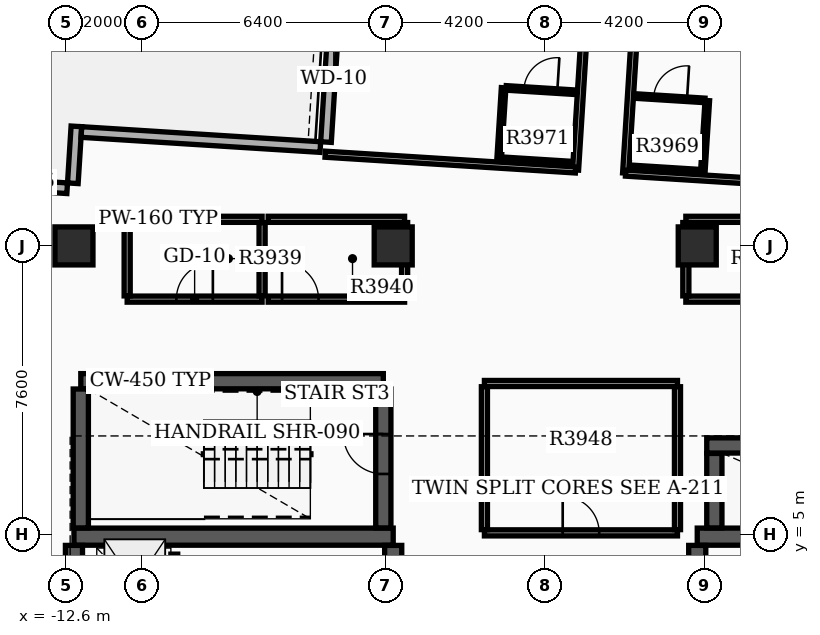
"""IFC4 building model, lengths in metres.
Left out: names, types, materials, properties, quantities, classifications, styles, units other than length and angle.
Written with IfcOpenShell. Run it as: python <this file> out.ifc"""

import sys

from ifc_helpers import new_model, si_unit, direction, frame, frame_2d, origin, origin_2d, place, context, subcontext, project, spatial, rectangle, extrude, element, fill, save


model = new_model("IFC4")
c1 = context("Model", 3, precision=1e-05, world=origin(), true_north=direction((0.0, 1.0)))
c2 = subcontext(c1, "Body", "Model", "MODEL_VIEW")
j1 = project(units=[si_unit("LENGTHUNIT", "METRE"), si_unit("PLANEANGLEUNIT", "RADIAN")], contexts=[c1])
p1 = place(None, origin())
s1 = spatial("IfcSite", under=j1, at=p1, CompositionType="ELEMENT")
p2 = place(p1, origin())
s2 = spatial("IfcBuilding", under=s1, at=p2, CompositionType="ELEMENT")
p3 = place(p2, frame((0.0, 0.0, 249.9)))
s3 = spatial("IfcBuildingStorey", under=s2, at=p3, CompositionType="ELEMENT", Elevation=249.9)
p4 = place(p3, frame((-12.4, 4.95, 0.0), z_axis=(0.0, 0.0, 1.0), x_axis=(1.0, 0.0, 0.0)))
e1 = element("IfcWall", 1, at=p4, inside=s3, PredefinedType="SHEAR", context=c2, shape_type="SweptSolid", body=[
    extrude(rectangle(XDim=8.4, YDim=0.45, at=frame_2d((4.2, 0.0))), origin(), (0.0, 0.0, 1.0), 3.7),
])
p5 = place(p3, frame((-12.4, -6.62, 0.0), z_axis=(0.0, 0.0, 1.0), x_axis=(0.0, 1.0, 0.0)))
e2 = element("IfcWall", 2, at=p5, inside=s3, PredefinedType="SHEAR", context=c2, shape_type="SweptSolid", body=[
    extrude(rectangle(XDim=11.34, YDim=0.45, at=frame_2d((5.67, 0.0))), origin(), (0.0, 0.0, 1.0), 3.7),
])
p6 = place(p3, frame((-4.0, -6.62, 0.0), z_axis=(0.0, 0.0, 1.0), x_axis=(0.0, 1.0, 0.0)))
e3 = element("IfcWall", 3, at=p6, inside=s3, PredefinedType="SHEAR", context=c2, shape_type="SweptSolid", body=[
    extrude(rectangle(XDim=11.34, YDim=0.45, at=frame_2d((5.67, 0.0))), origin(), (0.0, 0.0, 1.0), 3.7),
])
p7 = place(p6, frame((1.37, 0.0, 0.0)))
e4 = element("IfcOpeningElement", 4, at=p7, cuts=e3, PredefinedType="OPENING", context=c2, shape_type="SweptSolid", body=[
    extrude(rectangle(XDim=1.05, YDim=2.15, at=frame_2d((0.525, 1.075))), frame((0.0, 0.235, 0.0), z_axis=(0.0, -1.0, 0.0), x_axis=(1.0, 0.0, 0.0)), (0.0, 0.0, 1.0), 0.47),
])
p8 = place(p6, frame((6.97, 0.0, 0.0)))
e5 = element("IfcOpeningElement", 5, at=p8, cuts=e3, PredefinedType="OPENING", context=c2, shape_type="SweptSolid", body=[
    extrude(rectangle(XDim=1.05, YDim=2.15, at=frame_2d((0.525, 1.075))), frame((0.0, 0.235, 0.0), z_axis=(0.0, -1.0, 0.0), x_axis=(1.0, 0.0, 0.0)), (0.0, 0.0, 1.0), 0.47),
])
p9 = place(p3, frame((4.0, 4.95, 0.0), z_axis=(0.0, 0.0, 1.0), x_axis=(1.0, 0.0, 0.0)))
e6 = element("IfcWall", 6, at=p9, inside=s3, PredefinedType="SHEAR", context=c2, shape_type="SweptSolid", body=[
    extrude(rectangle(XDim=8.4, YDim=0.45, at=frame_2d((4.2, 0.0))), origin(), (0.0, 0.0, 1.0), 3.7),
])
p10 = place(p3, frame((4.0, -6.62, 0.0), z_axis=(0.0, 0.0, 1.0), x_axis=(0.0, 1.0, 0.0)))
e7 = element("IfcWall", 7, at=p10, inside=s3, PredefinedType="SHEAR", context=c2, shape_type="SweptSolid", body=[
    extrude(rectangle(XDim=11.34, YDim=0.45, at=frame_2d((5.67, 0.0))), origin(), (0.0, 0.0, 1.0), 3.7),
])
p11 = place(p10, frame((1.37, 0.0, 0.0)))
e8 = element("IfcOpeningElement", 8, at=p11, cuts=e7, PredefinedType="OPENING", context=c2, shape_type="SweptSolid", body=[
    extrude(rectangle(XDim=1.05, YDim=2.15, at=frame_2d((0.525, 1.075))), frame((0.0, 0.235, 0.0), z_axis=(0.0, -1.0, 0.0), x_axis=(1.0, 0.0, 0.0)), (0.0, 0.0, 1.0), 0.47),
])
p12 = place(p10, frame((6.97, 0.0, 0.0)))
e9 = element("IfcOpeningElement", 9, at=p12, cuts=e7, PredefinedType="OPENING", context=c2, shape_type="SweptSolid", body=[
    extrude(rectangle(XDim=1.05, YDim=2.15, at=frame_2d((0.525, 1.075))), frame((0.0, 0.235, 0.0), z_axis=(0.0, -1.0, 0.0), x_axis=(1.0, 0.0, 0.0)), (0.0, 0.0, 1.0), 0.47),
])
p13 = place(p3, frame((-12.22, 9.04, 0.0), z_axis=(0.0, 0.0, 1.0), x_axis=(1.0, 0.0, 0.0)))
e10 = element("IfcWall", 10, at=p13, inside=s3, PredefinedType="SHEAR", context=c2, shape_type="SweptSolid", body=[
    extrude(rectangle(XDim=7.96, YDim=0.4, at=frame_2d((3.98, 0.0))), origin(), (0.0, 0.0, 1.0), 3.7),
])
p14 = place(p3, frame((-12.22, 5.18, 0.0), z_axis=(0.0, 0.0, 1.0), x_axis=(0.0, 1.0, 0.0)))
e11 = element("IfcWall", 11, at=p14, inside=s3, PredefinedType="SHEAR", context=c2, shape_type="SweptSolid", body=[
    extrude(rectangle(XDim=3.655, YDim=0.4, at=frame_2d((1.828, 0.0))), origin(), (0.0, 0.0, 1.0), 3.7),
])
p15 = place(p3, frame((-4.26, 5.18, 0.0), z_axis=(0.0, 0.0, 1.0), x_axis=(0.0, 1.0, 0.0)))
e12 = element("IfcWall", 12, at=p15, inside=s3, PredefinedType="SHEAR", context=c2, shape_type="SweptSolid", body=[
    extrude(rectangle(XDim=3.655, YDim=0.4, at=frame_2d((1.828, 0.0))), origin(), (0.0, 0.0, 1.0), 3.7),
])
p16 = place(p15, frame((1.42, 0.0, 0.0)))
e13 = element("IfcOpeningElement", 13, at=p16, cuts=e12, PredefinedType="OPENING", context=c2, shape_type="SweptSolid", body=[
    extrude(rectangle(XDim=1.05, YDim=2.15, at=frame_2d((0.525, 1.075))), frame((0.0, 0.21, 0.0), z_axis=(0.0, -1.0, 0.0), x_axis=(1.0, 0.0, 0.0)), (0.0, 0.0, 1.0), 0.42),
])
p17 = place(p3, frame((4.45, 5.18, 0.0), z_axis=(0.0, 0.0, 1.0), x_axis=(0.0, 1.0, 0.0)))
e14 = element("IfcWall", 14, at=p17, inside=s3, PredefinedType="SHEAR", context=c2, shape_type="SweptSolid", body=[
    extrude(rectangle(XDim=1.96, YDim=0.4, at=frame_2d((0.98, 0.0))), origin(), (0.0, 0.0, 1.0), 3.7),
])
p18 = place(p3, frame((4.25, 7.35, 0.0), z_axis=(0.0, 0.0, 1.0), x_axis=(1.0, 0.0, 0.0)))
e15 = element("IfcWall", 15, at=p18, inside=s3, PredefinedType="SHEAR", context=c2, shape_type="SweptSolid", body=[
    extrude(rectangle(XDim=5.4, YDim=0.4, at=frame_2d((2.7, 0.0))), origin(), (0.0, 0.0, 1.0), 3.7),
])
for number, where, z_axis, x_axis in (
    (16, (-12.4, 12.6, 0.0), (0.0, 0.0, 1.0), (1.0, 0.0, 0.0)),
    (17, (4.0, 12.6, 0.0), (0.0, 0.0, 1.0), (1.0, 0.0, 0.0)),
    (18, (-4.0, 12.6, 0.0), (0.0, 0.0, 1.0), (1.0, 0.0, 0.0)),
):
    element("IfcColumn", number, at=place(p3, frame(where, z_axis=z_axis, x_axis=x_axis)), inside=s3, PredefinedType="COLUMN", context=c2, shape_type="SweptSolid", body=[
        extrude(rectangle(XDim=1.0, YDim=1.0, at=origin_2d()), origin(), (0.0, 0.0, 1.0), 3.9),
    ])
p19 = place(p3, frame((-4.846, 30.003, 0.0), z_axis=(0.0, 0.0, 1.0), x_axis=(-0.062779465852, -0.998027423805, 0.0)))
e19 = element("IfcWall", 19, at=p19, inside=s3, PredefinedType="STANDARD", context=c2, shape_type="SweptSolid", body=[
    extrude(rectangle(XDim=14.7, YDim=0.28, at=frame_2d((7.35, 0.0))), origin(), (0.0, 0.0, 1.0), 3.18),
])
p20 = place(p19, frame((0.85, 0.0, 0.8)))
e20 = element("IfcOpeningElement", 20, at=p20, cuts=e19, PredefinedType="OPENING", context=c2, shape_type="SweptSolid", body=[
    extrude(rectangle(XDim=1.6, YDim=1.7, at=frame_2d((0.8, 0.85))), frame((0.0, 0.15, 0.0), z_axis=(0.0, -1.0, 0.0), x_axis=(1.0, 0.0, 0.0)), (0.0, 0.0, 1.0), 0.3),
])
p21 = place(p19, frame((4.05, 0.0, 0.8)))
e21 = element("IfcOpeningElement", 21, at=p21, cuts=e19, PredefinedType="OPENING", context=c2, shape_type="SweptSolid", body=[
    extrude(rectangle(XDim=1.6, YDim=1.7, at=frame_2d((0.8, 0.85))), frame((0.0, 0.15, 0.0), z_axis=(0.0, -1.0, 0.0), x_axis=(1.0, 0.0, 0.0)), (0.0, 0.0, 1.0), 0.3),
])
p22 = place(p19, frame((7.25, 0.0, 0.8)))
e22 = element("IfcOpeningElement", 22, at=p22, cuts=e19, PredefinedType="OPENING", context=c2, shape_type="SweptSolid", body=[
    extrude(rectangle(XDim=1.6, YDim=1.7, at=frame_2d((0.8, 0.85))), frame((0.0, 0.15, 0.0), z_axis=(0.0, -1.0, 0.0), x_axis=(1.0, 0.0, 0.0)), (0.0, 0.0, 1.0), 0.3),
])
p23 = place(p19, frame((10.95, 0.0, 0.0)))
e23 = element("IfcOpeningElement", 23, at=p23, cuts=e19, PredefinedType="OPENING", context=c2, shape_type="SweptSolid", body=[
    extrude(rectangle(XDim=0.96, YDim=2.1, at=frame_2d((0.48, 1.05))), frame((0.0, 0.15, 0.0), z_axis=(0.0, -1.0, 0.0), x_axis=(1.0, 0.0, 0.0)), (0.0, 0.0, 1.0), 0.3),
])
p24 = place(p3, frame((-13.796, 14.194, 0.0), z_axis=(0.0, 0.0, 1.0), x_axis=(0.998023660242, -0.06283926796, 0.0)))
e24 = element("IfcWall", 24, at=p24, inside=s3, PredefinedType="STANDARD", context=c2, shape_type="SweptSolid", body=[
    extrude(rectangle(XDim=1.22, YDim=0.28, at=frame_2d((0.61, 0.0))), origin(), (0.0, 0.0, 1.0), 3.18),
])
p25 = place(p3, frame((-12.43, 14.249, 0.0), z_axis=(0.0, 0.0, 1.0), x_axis=(0.062824119533, 0.998024613927, 0.0)))
e25 = element("IfcWall", 25, at=p25, inside=s3, PredefinedType="STANDARD", context=c2, shape_type="SweptSolid", body=[
    extrude(rectangle(XDim=1.5, YDim=0.28, at=frame_2d((0.75, 0.0))), origin(), (0.0, 0.0, 1.0), 3.18),
])
p26 = place(p3, frame((-12.205, 15.597, 0.0), z_axis=(0.0, 0.0, 1.0), x_axis=(0.998024885752, -0.062819801181, 0.0)))
e26 = element("IfcWall", 26, at=p26, inside=s3, PredefinedType="STANDARD", context=c2, shape_type="SweptSolid", body=[
    extrude(rectangle(XDim=6.3, YDim=0.28, at=frame_2d((3.15, 0.0))), origin(), (0.0, 0.0, 1.0), 3.18),
])
p27 = place(p3, frame((-9.76, 2.5, 0.0), z_axis=(0.0, 0.0, 1.0), x_axis=(0.0, 1.0, 0.0)))
e27 = element("IfcWall", 27, at=p27, inside=s3, PredefinedType="SOLIDWALL", context=c2, shape_type="SweptSolid", body=[
    extrude(rectangle(XDim=1.99, YDim=0.18, at=frame_2d((0.995, 0.0))), origin(), (0.0, 0.0, 1.0), 3.17),
])
p28 = place(p3, frame((-11.0, 11.2, 0.0), z_axis=(0.0, 0.0, 1.0), x_axis=(1.0, 0.0, 0.0)))
e28 = element("IfcWall", 28, at=p28, inside=s3, PredefinedType="PARTITIONING", context=c2, shape_type="SweptSolid", body=[
    extrude(rectangle(XDim=3.55, YDim=0.16, at=frame_2d((1.775, 0.0))), origin(), (0.0, 0.0, 1.0), 3.17),
])
p29 = place(p28, frame((1.295, 0.0, 0.0)))
e29 = element("IfcOpeningElement", 29, at=p29, cuts=e28, PredefinedType="OPENING", context=c2, shape_type="SweptSolid", body=[
    extrude(rectangle(XDim=0.96, YDim=2.15, at=frame_2d((0.48, 1.075))), frame((0.0, 0.09, 0.0), z_axis=(0.0, -1.0, 0.0), x_axis=(1.0, 0.0, 0.0)), (0.0, 0.0, 1.0), 0.18),
])
p30 = place(p3, frame((-11.0, 13.3, 0.0), z_axis=(0.0, 0.0, 1.0), x_axis=(1.0, 0.0, 0.0)))
e30 = element("IfcWall", 30, at=p30, inside=s3, PredefinedType="PARTITIONING", context=c2, shape_type="SweptSolid", body=[
    extrude(rectangle(XDim=3.55, YDim=0.16, at=frame_2d((1.775, 0.0))), origin(), (0.0, 0.0, 1.0), 3.17),
])
for number, where, z_axis, x_axis in (
    (31, (-11.0, 11.285, 0.0), (0.0, 0.0, 1.0), (0.0, 1.0, 0.0)),
    (32, (-7.45, 11.285, 0.0), (0.0, 0.0, 1.0), (0.0, 1.0, 0.0)),
):
    element("IfcWall", number, at=place(p3, frame(where, z_axis=z_axis, x_axis=x_axis)), inside=s3, PredefinedType="PARTITIONING", context=c2, shape_type="SweptSolid", body=[
        extrude(rectangle(XDim=1.93, YDim=0.16, at=frame_2d((0.965, 0.0))), origin(), (0.0, 0.0, 1.0), 3.17),
    ])
p31 = place(p3, frame((-7.29, 11.2, 0.0), z_axis=(0.0, 0.0, 1.0), x_axis=(1.0, 0.0, 0.0)))
e33 = element("IfcWall", 33, at=p31, inside=s3, PredefinedType="PARTITIONING", context=c2, shape_type="SweptSolid", body=[
    extrude(rectangle(XDim=3.59, YDim=0.16, at=frame_2d((1.795, 0.0))), origin(), (0.0, 0.0, 1.0), 3.17),
])
p32 = place(p31, frame((0.365, 0.0, 0.0)))
e34 = element("IfcOpeningElement", 34, at=p32, cuts=e33, PredefinedType="OPENING", context=c2, shape_type="SweptSolid", body=[
    extrude(rectangle(XDim=0.96, YDim=2.15, at=frame_2d((0.48, 1.075))), frame((0.0, 0.09, 0.0), z_axis=(0.0, -1.0, 0.0), x_axis=(1.0, 0.0, 0.0)), (0.0, 0.0, 1.0), 0.18),
])
p33 = place(p3, frame((-7.29, 13.3, 0.0), z_axis=(0.0, 0.0, 1.0), x_axis=(1.0, 0.0, 0.0)))
e35 = element("IfcWall", 35, at=p33, inside=s3, PredefinedType="PARTITIONING", context=c2, shape_type="SweptSolid", body=[
    extrude(rectangle(XDim=3.59, YDim=0.16, at=frame_2d((1.795, 0.0))), origin(), (0.0, 0.0, 1.0), 3.17),
])
p34 = place(p3, frame((-3.7, 11.285, 0.0), z_axis=(0.0, 0.0, 1.0), x_axis=(0.0, 1.0, 0.0)))
e36 = element("IfcWall", 36, at=p34, inside=s3, PredefinedType="PARTITIONING", context=c2, shape_type="SweptSolid", body=[
    extrude(rectangle(XDim=1.93, YDim=0.16, at=frame_2d((0.965, 0.0))), origin(), (0.0, 0.0, 1.0), 3.17),
])
p35 = place(p3, frame((3.7, 11.2, 0.0), z_axis=(0.0, 0.0, 1.0), x_axis=(1.0, 0.0, 0.0)))
e37 = element("IfcWall", 37, at=p35, inside=s3, PredefinedType="PARTITIONING", context=c2, shape_type="SweptSolid", body=[
    extrude(rectangle(XDim=3.75, YDim=0.16, at=frame_2d((1.875, 0.0))), origin(), (0.0, 0.0, 1.0), 3.17),
])
p36 = place(p35, frame((2.345, 0.0, 0.0)))
e38 = element("IfcOpeningElement", 38, at=p36, cuts=e37, PredefinedType="OPENING", context=c2, shape_type="SweptSolid", body=[
    extrude(rectangle(XDim=0.96, YDim=2.15, at=frame_2d((0.48, 1.075))), frame((0.0, 0.09, 0.0), z_axis=(0.0, -1.0, 0.0), x_axis=(1.0, 0.0, 0.0)), (0.0, 0.0, 1.0), 0.18),
])
p37 = place(p3, frame((3.7, 13.3, 0.0), z_axis=(0.0, 0.0, 1.0), x_axis=(1.0, 0.0, 0.0)))
e39 = element("IfcWall", 39, at=p37, inside=s3, PredefinedType="PARTITIONING", context=c2, shape_type="SweptSolid", body=[
    extrude(rectangle(XDim=3.75, YDim=0.16, at=frame_2d((1.875, 0.0))), origin(), (0.0, 0.0, 1.0), 3.17),
])
p38 = place(p3, frame((3.7, 11.285, 0.0), z_axis=(0.0, 0.0, 1.0), x_axis=(0.0, 1.0, 0.0)))
e40 = element("IfcWall", 40, at=p38, inside=s3, PredefinedType="PARTITIONING", context=c2, shape_type="SweptSolid", body=[
    extrude(rectangle(XDim=1.93, YDim=0.16, at=frame_2d((0.965, 0.0))), origin(), (0.0, 0.0, 1.0), 3.17),
])
p39 = place(p3, frame((-1.6, 5.05, 0.0), z_axis=(0.0, 0.0, 1.0), x_axis=(1.0, 0.0, 0.0)))
e41 = element("IfcWall", 41, at=p39, inside=s3, PredefinedType="PARTITIONING", context=c2, shape_type="SweptSolid", body=[
    extrude(rectangle(XDim=5.08, YDim=0.16, at=frame_2d((2.54, 0.0))), origin(), (0.0, 0.0, 1.0), 3.17),
])
p40 = place(p39, frame((2.06, 0.0, 0.0)))
e42 = element("IfcOpeningElement", 42, at=p40, cuts=e41, PredefinedType="OPENING", context=c2, shape_type="SweptSolid", body=[
    extrude(rectangle(XDim=0.96, YDim=2.15, at=frame_2d((0.48, 1.075))), frame((0.0, 0.09, 0.0), z_axis=(0.0, -1.0, 0.0), x_axis=(1.0, 0.0, 0.0)), (0.0, 0.0, 1.0), 0.18),
])
p41 = place(p3, frame((-1.6, 8.98, 0.0), z_axis=(0.0, 0.0, 1.0), x_axis=(1.0, 0.0, 0.0)))
e43 = element("IfcWall", 43, at=p41, inside=s3, PredefinedType="PARTITIONING", context=c2, shape_type="SweptSolid", body=[
    extrude(rectangle(XDim=5.08, YDim=0.16, at=frame_2d((2.54, 0.0))), origin(), (0.0, 0.0, 1.0), 3.17),
])
for number, where, z_axis, x_axis in (
    (44, (-1.6, 5.135, 0.0), (0.0, 0.0, 1.0), (0.0, 1.0, 0.0)),
    (45, (3.48, 5.135, 0.0), (0.0, 0.0, 1.0), (0.0, 1.0, 0.0)),
):
    element("IfcWall", number, at=place(p3, frame(where, z_axis=z_axis, x_axis=x_axis)), inside=s3, PredefinedType="PARTITIONING", context=c2, shape_type="SweptSolid", body=[
        extrude(rectangle(XDim=3.76, YDim=0.16, at=frame_2d((1.88, 0.0))), origin(), (0.0, 0.0, 1.0), 3.17),
    ])
p42 = place(p3, frame((2.115, 14.516, 0.0), z_axis=(0.0, 0.0, 1.0), x_axis=(0.062791373209, 0.998026674719, 0.0)))
e46 = element("IfcWall", 46, at=p42, inside=s3, PredefinedType="PARTITIONING", context=c2, shape_type="SweptSolid", body=[
    extrude(rectangle(XDim=15.012, YDim=0.16, at=frame_2d((7.506, 0.0))), origin(), (0.0, 0.0, 1.0), 3.17),
])
p43 = place(p42, frame((13.76, 0.0, 0.0)))
e47 = element("IfcOpeningElement", 47, at=p43, cuts=e46, PredefinedType="OPENING", context=c2, shape_type="SweptSolid", body=[
    extrude(rectangle(XDim=0.96, YDim=2.15, at=frame_2d((0.48, 1.075))), frame((0.0, 0.09, 0.0), z_axis=(0.0, -1.0, 0.0), x_axis=(1.0, 0.0, 0.0)), (0.0, 0.0, 1.0), 0.18),
])
p44 = place(p3, frame((2.115, 14.516, 0.0), z_axis=(0.0, 0.0, 1.0), x_axis=(0.998025986639, -0.062802308829, 0.0)))
e48 = element("IfcWall", 48, at=p44, inside=s3, PredefinedType="PARTITIONING", context=c2, shape_type="SweptSolid", body=[
    extrude(rectangle(XDim=5.52, YDim=0.16, at=frame_2d((2.76, 0.0))), origin(), (0.0, 0.0, 1.0), 3.17),
])
p45 = place(p3, frame((2.383, 16.543, 0.0), z_axis=(0.0, 0.0, 1.0), x_axis=(0.998027972529, -0.062770741989, 0.0)))
e49 = element("IfcWall", 49, at=p45, inside=s3, PredefinedType="PARTITIONING", context=c2, shape_type="SweptSolid", body=[
    extrude(rectangle(XDim=1.82, YDim=0.12, at=frame_2d((0.91, 0.0))), origin(), (0.0, 0.0, 1.0), 3.17),
])
p46 = place(p45, frame((0.47, 0.0, 0.0)))
e50 = element("IfcOpeningElement", 50, at=p46, cuts=e49, PredefinedType="OPENING", context=c2, shape_type="SweptSolid", body=[
    extrude(rectangle(XDim=0.88, YDim=2.1, at=frame_2d((0.44, 1.05))), frame((0.0, 0.07, 0.0), z_axis=(0.0, -1.0, 0.0), x_axis=(1.0, 0.0, 0.0)), (0.0, 0.0, 1.0), 0.14),
])
p47 = place(p3, frame((2.265, 14.667, 0.0), z_axis=(0.0, 0.0, 1.0), x_axis=(0.998027443946, -0.062779145668, 0.0)))
e51 = element("IfcWall", 51, at=p47, inside=s3, PredefinedType="PARTITIONING", context=c2, shape_type="SweptSolid", body=[
    extrude(rectangle(XDim=1.82, YDim=0.12, at=frame_2d((0.91, 0.0))), origin(), (0.0, 0.0, 1.0), 3.17),
])
p48 = place(p3, frame((4.147, 14.548, 0.0), z_axis=(0.0, 0.0, 1.0), x_axis=(0.062725942896, 0.998030789148, 0.0)))
e52 = element("IfcWall", 52, at=p48, inside=s3, PredefinedType="PARTITIONING", context=c2, shape_type="SweptSolid", body=[
    extrude(rectangle(XDim=1.88, YDim=0.12, at=frame_2d((0.94, 0.0))), origin(), (0.0, 0.0, 1.0), 3.17),
])
p49 = place(p3, frame((0.798, 14.599, 0.0), z_axis=(0.0, 0.0, 1.0), x_axis=(0.062791373209, 0.998026674719, 0.0)))
e53 = element("IfcWall", 53, at=p49, inside=s3, PredefinedType="PARTITIONING", context=c2, shape_type="SweptSolid", body=[
    extrude(rectangle(XDim=15.012, YDim=0.16, at=frame_2d((7.506, 0.0))), origin(), (0.0, 0.0, 1.0), 3.17),
])
p50 = place(p49, frame((13.76, 0.0, 0.0)))
e54 = element("IfcOpeningElement", 54, at=p50, cuts=e53, PredefinedType="OPENING", context=c2, shape_type="SweptSolid", body=[
    extrude(rectangle(XDim=0.96, YDim=2.15, at=frame_2d((0.48, 1.075))), frame((0.0, 0.09, 0.0), z_axis=(0.0, -1.0, 0.0), x_axis=(1.0, 0.0, 0.0)), (0.0, 0.0, 1.0), 0.18),
])
p51 = place(p3, frame((0.798, 14.599, 0.0), z_axis=(0.0, 0.0, 1.0), x_axis=(-0.998025424787, 0.06281123689, 0.0)))
e55 = element("IfcWall", 55, at=p51, inside=s3, PredefinedType="PARTITIONING", context=c2, shape_type="SweptSolid", body=[
    extrude(rectangle(XDim=6.6, YDim=0.16, at=frame_2d((3.3, 0.0))), origin(), (0.0, 0.0, 1.0), 3.17),
])
p52 = place(p3, frame((-1.03, 16.758, 0.0), z_axis=(0.0, 0.0, 1.0), x_axis=(0.998027443946, -0.062779145668, 0.0)))
e56 = element("IfcWall", 56, at=p52, inside=s3, PredefinedType="PARTITIONING", context=c2, shape_type="SweptSolid", body=[
    extrude(rectangle(XDim=1.82, YDim=0.12, at=frame_2d((0.91, 0.0))), origin(), (0.0, 0.0, 1.0), 3.17),
])
p53 = place(p52, frame((0.47, 0.0, 0.0)))
e57 = element("IfcOpeningElement", 57, at=p53, cuts=e56, PredefinedType="OPENING", context=c2, shape_type="SweptSolid", body=[
    extrude(rectangle(XDim=0.88, YDim=2.1, at=frame_2d((0.44, 1.05))), frame((0.0, 0.07, 0.0), z_axis=(0.0, -1.0, 0.0), x_axis=(1.0, 0.0, 0.0)), (0.0, 0.0, 1.0), 0.14),
])
p54 = place(p3, frame((-1.148, 14.881, 0.0), z_axis=(0.0, 0.0, 1.0), x_axis=(0.998027972529, -0.062770741989, 0.0)))
e58 = element("IfcWall", 58, at=p54, inside=s3, PredefinedType="PARTITIONING", context=c2, shape_type="SweptSolid", body=[
    extrude(rectangle(XDim=1.82, YDim=0.12, at=frame_2d((0.91, 0.0))), origin(), (0.0, 0.0, 1.0), 3.17),
])
p55 = place(p3, frame((-1.213, 14.885, 0.0), z_axis=(0.0, 0.0, 1.0), x_axis=(0.062725942896, 0.998030789148, 0.0)))
e59 = element("IfcWall", 59, at=p55, inside=s3, PredefinedType="PARTITIONING", context=c2, shape_type="SweptSolid", body=[
    extrude(rectangle(XDim=1.88, YDim=0.12, at=frame_2d((0.94, 0.0))), origin(), (0.0, 0.0, 1.0), 3.17),
])
p56 = place(p16, origin())
e60 = element("IfcDoor", 60, at=p56, inside=s3, OperationType="SINGLE_SWING_RIGHT", PredefinedType="DOOR", context=c2, shape_type="SweptSolid", body=[
    extrude(rectangle(XDim=1.05, YDim=2.15, at=frame_2d((0.525, 1.075))), frame((0.0, 0.025, 0.0), z_axis=(0.0, -1.0, 0.0), x_axis=(1.0, 0.0, 0.0)), (0.0, 0.0, 1.0), 0.05),
])
fill(e13, e60)
p57 = place(p29, origin())
e61 = element("IfcDoor", 61, at=p57, inside=s3, OperationType="SINGLE_SWING_RIGHT", PredefinedType="DOOR", context=c2, shape_type="SweptSolid", body=[
    extrude(rectangle(XDim=0.96, YDim=2.15, at=frame_2d((0.48, 1.075))), frame((0.0, 0.025, 0.0), z_axis=(0.0, -1.0, 0.0), x_axis=(1.0, 0.0, 0.0)), (0.0, 0.0, 1.0), 0.05),
])
fill(e29, e61)
p58 = place(p32, origin())
e62 = element("IfcDoor", 62, at=p58, inside=s3, OperationType="SINGLE_SWING_LEFT", PredefinedType="DOOR", context=c2, shape_type="SweptSolid", body=[
    extrude(rectangle(XDim=0.96, YDim=2.15, at=frame_2d((0.48, 1.075))), frame((0.0, 0.025, 0.0), z_axis=(0.0, -1.0, 0.0), x_axis=(1.0, 0.0, 0.0)), (0.0, 0.0, 1.0), 0.05),
])
fill(e34, e62)
p59 = place(p40, origin())
e63 = element("IfcDoor", 63, at=p59, inside=s3, OperationType="SINGLE_SWING_LEFT", PredefinedType="DOOR", context=c2, shape_type="SweptSolid", body=[
    extrude(rectangle(XDim=0.96, YDim=2.15, at=frame_2d((0.48, 1.075))), frame((0.0, 0.025, 0.0), z_axis=(0.0, -1.0, 0.0), x_axis=(1.0, 0.0, 0.0)), (0.0, 0.0, 1.0), 0.05),
])
fill(e42, e63)
p60 = place(p46, origin())
e64 = element("IfcDoor", 64, at=p60, inside=s3, OperationType="SINGLE_SWING_RIGHT", PredefinedType="DOOR", context=c2, shape_type="SweptSolid", body=[
    extrude(rectangle(XDim=0.88, YDim=2.1, at=frame_2d((0.44, 1.05))), frame((0.0, 0.025, 0.0), z_axis=(0.0, -1.0, 0.0), x_axis=(1.0, 0.0, 0.0)), (0.0, 0.0, 1.0), 0.05),
])
fill(e50, e64)
p61 = place(p53, origin())
e65 = element("IfcDoor", 65, at=p61, inside=s3, OperationType="SINGLE_SWING_RIGHT", PredefinedType="DOOR", context=c2, shape_type="SweptSolid", body=[
    extrude(rectangle(XDim=0.88, YDim=2.1, at=frame_2d((0.44, 1.05))), frame((0.0, 0.025, 0.0), z_axis=(0.0, -1.0, 0.0), x_axis=(1.0, 0.0, 0.0)), (0.0, 0.0, 1.0), 0.05),
])
fill(e57, e65)
save(model, sys.argv[1])
